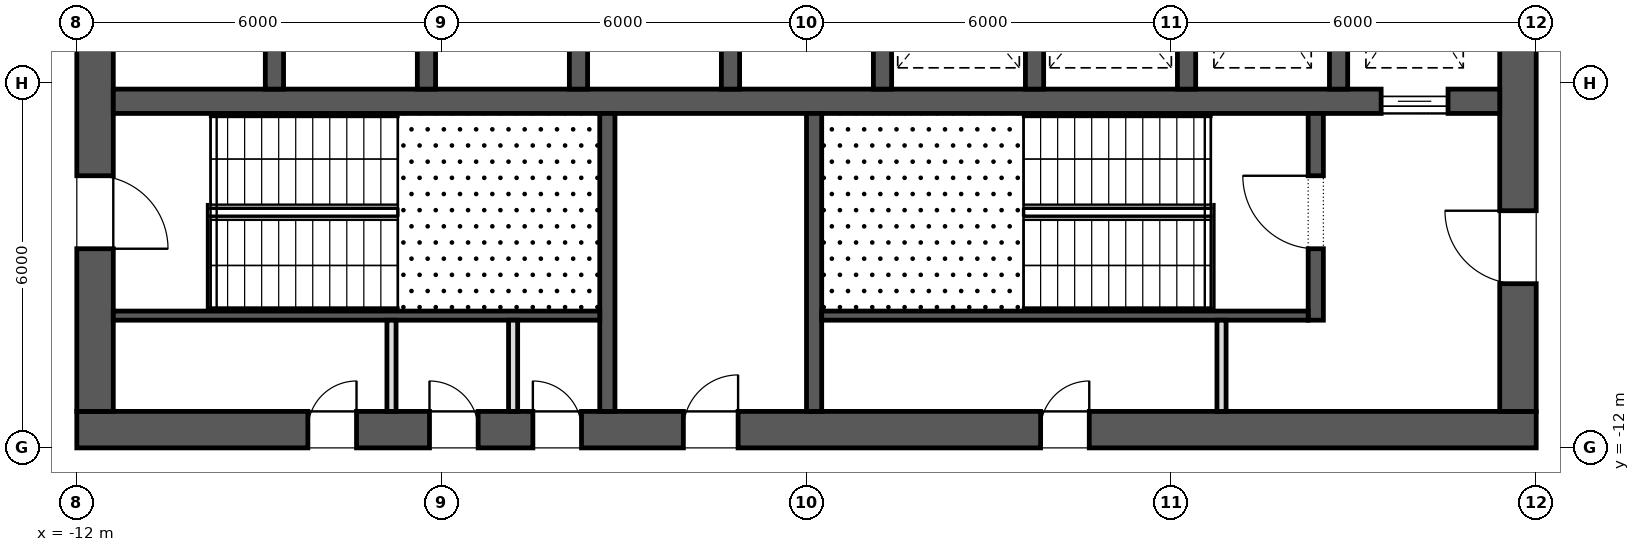
"""IFC4 building model, lengths in metres.
Left out: names, types, materials, properties, quantities, classifications, styles, units other than length and angle.
Written with IfcOpenShell. Run it as: python <this file> out.ifc"""

import sys

from ifc_helpers import new_model, si_unit, direction, frame, frame_2d, origin, place, context, subcontext, project, spatial, rectangle, extrude, element, fill, save


model = new_model("IFC4")
c1 = context("Model", 3, precision=1e-05, world=origin(), true_north=direction((0.0, 1.0)))
c2 = subcontext(c1, "Body", "Model", "MODEL_VIEW")
j1 = project(units=[si_unit("LENGTHUNIT", "METRE"), si_unit("PLANEANGLEUNIT", "RADIAN")], contexts=[c1])
p1 = place(None, origin())
s1 = spatial("IfcSite", under=j1, at=p1, CompositionType="ELEMENT")
p2 = place(p1, origin())
s2 = spatial("IfcBuilding", under=s1, at=p2, CompositionType="ELEMENT")
p3 = place(p2, frame((0.0, 0.0, 86.5)))
s3 = spatial("IfcBuildingStorey", under=s2, at=p3, CompositionType="ELEMENT", Elevation=86.5)
p4 = place(p3, frame((-12.0, -11.7, 0.0), z_axis=(0.0, 0.0, 1.0), x_axis=(1.0, 0.0, 0.0)))
e1 = element("IfcWall", 1, at=p4, inside=s3, PredefinedType="SHEAR", context=c2, shape_type="SweptSolid", body=[
    extrude(rectangle(XDim=24.0, YDim=0.6, at=frame_2d((12.0, 0.0))), origin(), (0.0, 0.0, 1.0), 4.2),
])
p5 = place(p4, frame((9.975, 0.0, 0.0)))
e2 = element("IfcOpeningElement", 2, at=p5, cuts=e1, PredefinedType="OPENING", context=c2, shape_type="SweptSolid", body=[
    extrude(rectangle(XDim=0.9, YDim=2.1, at=frame_2d((0.45, 1.05))), frame((0.0, 0.312, 0.0), z_axis=(0.0, -1.0, 0.0), x_axis=(1.0, 0.0, 0.0)), (0.0, 0.0, 1.0), 0.624),
])
p6 = place(p4, frame((3.8, 0.0, 0.0)))
e3 = element("IfcOpeningElement", 3, at=p6, cuts=e1, PredefinedType="OPENING", context=c2, shape_type="SweptSolid", body=[
    extrude(rectangle(XDim=0.8, YDim=2.1, at=frame_2d((0.4, 1.05))), frame((0.0, 0.312, 0.0), z_axis=(0.0, -1.0, 0.0), x_axis=(1.0, 0.0, 0.0)), (0.0, 0.0, 1.0), 0.624),
])
p7 = place(p4, frame((5.8, 0.0, 0.0)))
e4 = element("IfcOpeningElement", 4, at=p7, cuts=e1, PredefinedType="OPENING", context=c2, shape_type="SweptSolid", body=[
    extrude(rectangle(XDim=0.8, YDim=2.1, at=frame_2d((0.4, 1.05))), frame((0.0, 0.312, 0.0), z_axis=(0.0, -1.0, 0.0), x_axis=(1.0, 0.0, 0.0)), (0.0, 0.0, 1.0), 0.624),
])
p8 = place(p4, frame((7.5, 0.0, 0.0)))
e5 = element("IfcOpeningElement", 5, at=p8, cuts=e1, PredefinedType="OPENING", context=c2, shape_type="SweptSolid", body=[
    extrude(rectangle(XDim=0.8, YDim=2.1, at=frame_2d((0.4, 1.05))), frame((0.0, 0.312, 0.0), z_axis=(0.0, -1.0, 0.0), x_axis=(1.0, 0.0, 0.0)), (0.0, 0.0, 1.0), 0.624),
])
p9 = place(p4, frame((15.85, 0.0, 0.0)))
e6 = element("IfcOpeningElement", 6, at=p9, cuts=e1, PredefinedType="OPENING", context=c2, shape_type="SweptSolid", body=[
    extrude(rectangle(XDim=0.8, YDim=2.1, at=frame_2d((0.4, 1.05))), frame((0.0, 0.312, 0.0), z_axis=(0.0, -1.0, 0.0), x_axis=(1.0, 0.0, 0.0)), (0.0, 0.0, 1.0), 0.624),
])
p10 = place(p3, frame((11.7, -11.4, 0.0), z_axis=(0.0, 0.0, 1.0), x_axis=(0.0, 1.0, 0.0)))
e7 = element("IfcWall", 7, at=p10, inside=s3, PredefinedType="SHEAR", context=c2, shape_type="SweptSolid", body=[
    extrude(rectangle(XDim=22.8, YDim=0.6, at=frame_2d((11.4, 0.0))), origin(), (0.0, 0.0, 1.0), 4.2),
])
p11 = place(p10, frame((10.2, 0.0, 0.0)))
e8 = element("IfcOpeningElement", 8, at=p11, cuts=e7, PredefinedType="OPENING", context=c2, shape_type="SweptSolid", body=[
    extrude(rectangle(XDim=2.4, YDim=2.1, at=frame_2d((1.2, 1.05))), frame((0.0, 0.312, 0.0), z_axis=(0.0, -1.0, 0.0), x_axis=(1.0, 0.0, 0.0)), (0.0, 0.0, 1.0), 0.624),
])
p12 = place(p10, frame((19.5, 0.0, 0.0)))
e9 = element("IfcOpeningElement", 9, at=p12, cuts=e7, PredefinedType="OPENING", context=c2, shape_type="SweptSolid", body=[
    extrude(rectangle(XDim=1.2, YDim=2.1, at=frame_2d((0.6, 1.05))), frame((0.0, 0.312, 0.0), z_axis=(0.0, -1.0, 0.0), x_axis=(1.0, 0.0, 0.0)), (0.0, 0.0, 1.0), 0.624),
])
p13 = place(p10, frame((2.1, 0.0, 0.0)))
e10 = element("IfcOpeningElement", 10, at=p13, cuts=e7, PredefinedType="OPENING", context=c2, shape_type="SweptSolid", body=[
    extrude(rectangle(XDim=1.2, YDim=2.1, at=frame_2d((0.6, 1.05))), frame((0.0, 0.312, 0.0), z_axis=(0.0, -1.0, 0.0), x_axis=(1.0, 0.0, 0.0)), (0.0, 0.0, 1.0), 0.624),
])
p14 = place(p3, frame((-11.7, -11.4, 0.0), z_axis=(0.0, 0.0, 1.0), x_axis=(0.0, 1.0, 0.0)))
e11 = element("IfcWall", 11, at=p14, inside=s3, PredefinedType="SHEAR", context=c2, shape_type="SweptSolid", body=[
    extrude(rectangle(XDim=22.8, YDim=0.6, at=frame_2d((11.4, 0.0))), origin(), (0.0, 0.0, 1.0), 4.2),
])
p15 = place(p14, frame((10.2, 0.0, 0.0)))
e12 = element("IfcOpeningElement", 12, at=p15, cuts=e11, PredefinedType="OPENING", context=c2, shape_type="SweptSolid", body=[
    extrude(rectangle(XDim=2.4, YDim=2.1, at=frame_2d((1.2, 1.05))), frame((0.0, 0.312, 0.0), z_axis=(0.0, -1.0, 0.0), x_axis=(1.0, 0.0, 0.0)), (0.0, 0.0, 1.0), 0.624),
])
p16 = place(p14, frame((18.925, 0.0, 0.0)))
e13 = element("IfcOpeningElement", 13, at=p16, cuts=e11, PredefinedType="OPENING", context=c2, shape_type="SweptSolid", body=[
    extrude(rectangle(XDim=1.2, YDim=2.1, at=frame_2d((0.6, 1.05))), frame((0.0, 0.312, 0.0), z_axis=(0.0, -1.0, 0.0), x_axis=(1.0, 0.0, 0.0)), (0.0, 0.0, 1.0), 0.624),
])
p17 = place(p14, frame((2.675, 0.0, 0.0)))
e14 = element("IfcOpeningElement", 14, at=p17, cuts=e11, PredefinedType="OPENING", context=c2, shape_type="SweptSolid", body=[
    extrude(rectangle(XDim=1.2, YDim=2.1, at=frame_2d((0.6, 1.05))), frame((0.0, 0.312, 0.0), z_axis=(0.0, -1.0, 0.0), x_axis=(1.0, 0.0, 0.0)), (0.0, 0.0, 1.0), 0.624),
])
p18 = place(p3, frame((-11.4, -6.3, 0.0), z_axis=(0.0, 0.0, 1.0), x_axis=(1.0, 0.0, 0.0)))
e15 = element("IfcWall", 15, at=p18, inside=s3, PredefinedType="SHEAR", context=c2, shape_type="SweptSolid", body=[
    extrude(rectangle(XDim=22.8, YDim=0.4, at=frame_2d((11.4, 0.0))), origin(), (0.0, 0.0, 1.0), 4.2),
])
p19 = place(p18, frame((20.85, 0.0, 0.0)))
e16 = element("IfcOpeningElement", 16, at=p19, cuts=e15, PredefinedType="OPENING", context=c2, shape_type="SweptSolid", body=[
    extrude(rectangle(XDim=1.1, YDim=2.1, at=frame_2d((0.55, 1.05))), frame((0.0, 0.212, 0.0), z_axis=(0.0, -1.0, 0.0), x_axis=(1.0, 0.0, 0.0)), (0.0, 0.0, 1.0), 0.424),
])
for number, where, z_axis, x_axis in (
    (17, (-8.75, -6.1, 0.0), (0.0, 0.0, 1.0), (0.0, 1.0, 0.0)),
    (18, (-6.25, -6.1, 0.0), (0.0, 0.0, 1.0), (0.0, 1.0, 0.0)),
    (19, (-3.75, -6.1, 0.0), (0.0, 0.0, 1.0), (0.0, 1.0, 0.0)),
    (20, (-1.25, -6.1, 0.0), (0.0, 0.0, 1.0), (0.0, 1.0, 0.0)),
    (21, (1.25, -6.1, 0.0), (0.0, 0.0, 1.0), (0.0, 1.0, 0.0)),
    (22, (3.75, -6.1, 0.0), (0.0, 0.0, 1.0), (0.0, 1.0, 0.0)),
    (23, (6.25, -6.1, 0.0), (0.0, 0.0, 1.0), (0.0, 1.0, 0.0)),
    (24, (8.75, -6.1, 0.0), (0.0, 0.0, 1.0), (0.0, 1.0, 0.0)),
):
    element("IfcWall", number, at=place(p3, frame(where, z_axis=z_axis, x_axis=x_axis)), inside=s3, PredefinedType="SHEAR", context=c2, shape_type="SweptSolid", body=[
        extrude(rectangle(XDim=2.9, YDim=0.3, at=frame_2d((1.45, 0.0))), origin(), (0.0, 0.0, 1.0), 4.2),
    ])
for number, where, z_axis, x_axis in (
    (25, (-3.275, -11.4, 0.0), (0.0, 0.0, 1.0), (0.0, 1.0, 0.0)),
    (26, (0.125, -11.4, 0.0), (0.0, 0.0, 1.0), (0.0, 1.0, 0.0)),
):
    element("IfcWall", number, at=place(p3, frame(where, z_axis=z_axis, x_axis=x_axis)), inside=s3, PredefinedType="SHEAR", context=c2, shape_type="SweptSolid", body=[
        extrude(rectangle(XDim=4.9, YDim=0.25, at=frame_2d((2.45, 0.0))), origin(), (0.0, 0.0, 1.0), 3.9),
    ])
p20 = place(p3, frame((8.375, -9.9, 0.0), z_axis=(0.0, 0.0, 1.0), x_axis=(0.0, 1.0, 0.0)))
e27 = element("IfcWall", 27, at=p20, inside=s3, PredefinedType="SHEAR", context=c2, shape_type="SweptSolid", body=[
    extrude(rectangle(XDim=3.4, YDim=0.25, at=frame_2d((1.7, 0.0))), origin(), (0.0, 0.0, 1.0), 3.9),
])
p21 = place(p20, frame((1.175, 0.0, 0.0)))
e28 = element("IfcOpeningElement", 28, at=p21, cuts=e27, PredefinedType="OPENING", context=c2, shape_type="SweptSolid", body=[
    extrude(rectangle(XDim=1.2, YDim=2.1, at=frame_2d((0.6, 1.05))), frame((0.0, 0.137, 0.0), z_axis=(0.0, -1.0, 0.0), x_axis=(1.0, 0.0, 0.0)), (0.0, 0.0, 1.0), 0.274),
])
for number, where, z_axis, x_axis in (
    (29, (-11.4, -9.825, 0.0), (0.0, 0.0, 1.0), (1.0, 0.0, 0.0)),
    (30, (0.25, -9.825, 0.0), (0.0, 0.0, 1.0), (1.0, 0.0, 0.0)),
):
    element("IfcWall", number, at=place(p3, frame(where, z_axis=z_axis, x_axis=x_axis)), inside=s3, PredefinedType="SHEAR", context=c2, shape_type="SweptSolid", body=[
        extrude(rectangle(XDim=8.0, YDim=0.15, at=frame_2d((4.0, 0.0))), origin(), (0.0, 0.0, 1.0), 3.9),
    ])
for number, where, z_axis, x_axis in (
    (31, (-6.825, -11.4, 0.0), (0.0, 0.0, 1.0), (0.0, 1.0, 0.0)),
    (32, (-4.825, -11.4, 0.0), (0.0, 0.0, 1.0), (0.0, 1.0, 0.0)),
    (33, (6.825, -11.4, 0.0), (0.0, 0.0, 1.0), (0.0, 1.0, 0.0)),
):
    element("IfcWall", number, at=place(p3, frame(where, z_axis=z_axis, x_axis=x_axis)), inside=s3, PredefinedType="PARTITIONING", context=c2, shape_type="SweptSolid", body=[
        extrude(rectangle(XDim=1.5, YDim=0.15, at=frame_2d((0.75, 0.0))), origin(), (0.0, 0.0, 1.0), 3.9),
    ])
p22 = place(p19, origin())
e34 = element("IfcDoor", 34, at=p22, inside=s3, OperationType="SLIDING_TO_LEFT", PredefinedType="DOOR", context=c2, shape_type="SweptSolid", body=[
    extrude(rectangle(XDim=1.1, YDim=2.1, at=frame_2d((0.55, 1.05))), frame((0.0, 0.025, 0.0), z_axis=(0.0, -1.0, 0.0), x_axis=(1.0, 0.0, 0.0)), (0.0, 0.0, 1.0), 0.05),
])
fill(e16, e34)
p23 = place(p17, frame((1.2, 0.0, 0.0), z_axis=(0.0, 0.0, 1.0), x_axis=(-1.0, 0.0, 0.0)))
e35 = element("IfcDoor", 35, at=p23, inside=s3, OperationType="SINGLE_SWING_LEFT", PredefinedType="DOOR", context=c2, shape_type="SweptSolid", body=[
    extrude(rectangle(XDim=1.2, YDim=2.1, at=frame_2d((0.6, 1.05))), frame((0.0, 0.025, 0.0), z_axis=(0.0, -1.0, 0.0), x_axis=(1.0, 0.0, 0.0)), (0.0, 0.0, 1.0), 0.05),
])
fill(e14, e35)
p24 = place(p21, origin())
e36 = element("IfcDoor", 36, at=p24, inside=s3, OperationType="SINGLE_SWING_LEFT", PredefinedType="DOOR", context=c2, shape_type="SweptSolid", body=[
    extrude(rectangle(XDim=1.2, YDim=2.1, at=frame_2d((0.6, 1.05))), frame((0.0, 0.025, 0.0), z_axis=(0.0, -1.0, 0.0), x_axis=(1.0, 0.0, 0.0)), (0.0, 0.0, 1.0), 0.05),
])
fill(e28, e36)
p25 = place(p13, origin())
e37 = element("IfcDoor", 37, at=p25, inside=s3, OperationType="SINGLE_SWING_LEFT", PredefinedType="DOOR", context=c2, shape_type="SweptSolid", body=[
    extrude(rectangle(XDim=1.2, YDim=2.1, at=frame_2d((0.6, 1.05))), frame((0.0, 0.025, 0.0), z_axis=(0.0, -1.0, 0.0), x_axis=(1.0, 0.0, 0.0)), (0.0, 0.0, 1.0), 0.05),
])
fill(e10, e37)
p26 = place(p5, origin())
e38 = element("IfcDoor", 38, at=p26, inside=s3, OperationType="SINGLE_SWING_LEFT", PredefinedType="DOOR", context=c2, shape_type="SweptSolid", body=[
    extrude(rectangle(XDim=0.9, YDim=2.1, at=frame_2d((0.45, 1.05))), frame((0.0, 0.025, 0.0), z_axis=(0.0, -1.0, 0.0), x_axis=(1.0, 0.0, 0.0)), (0.0, 0.0, 1.0), 0.05),
])
fill(e2, e38)
p27 = place(p6, origin())
e39 = element("IfcDoor", 39, at=p27, inside=s3, OperationType="SINGLE_SWING_LEFT", PredefinedType="DOOR", context=c2, shape_type="SweptSolid", body=[
    extrude(rectangle(XDim=0.8, YDim=2.1, at=frame_2d((0.4, 1.05))), frame((0.0, 0.025, 0.0), z_axis=(0.0, -1.0, 0.0), x_axis=(1.0, 0.0, 0.0)), (0.0, 0.0, 1.0), 0.05),
])
fill(e3, e39)
p28 = place(p7, origin())
e40 = element("IfcDoor", 40, at=p28, inside=s3, OperationType="SINGLE_SWING_RIGHT", PredefinedType="DOOR", context=c2, shape_type="SweptSolid", body=[
    extrude(rectangle(XDim=0.8, YDim=2.1, at=frame_2d((0.4, 1.05))), frame((0.0, 0.025, 0.0), z_axis=(0.0, -1.0, 0.0), x_axis=(1.0, 0.0, 0.0)), (0.0, 0.0, 1.0), 0.05),
])
fill(e4, e40)
p29 = place(p8, origin())
e41 = element("IfcDoor", 41, at=p29, inside=s3, OperationType="SINGLE_SWING_RIGHT", PredefinedType="DOOR", context=c2, shape_type="SweptSolid", body=[
    extrude(rectangle(XDim=0.8, YDim=2.1, at=frame_2d((0.4, 1.05))), frame((0.0, 0.025, 0.0), z_axis=(0.0, -1.0, 0.0), x_axis=(1.0, 0.0, 0.0)), (0.0, 0.0, 1.0), 0.05),
])
fill(e5, e41)
p30 = place(p9, origin())
e42 = element("IfcDoor", 42, at=p30, inside=s3, OperationType="SINGLE_SWING_LEFT", PredefinedType="DOOR", context=c2, shape_type="SweptSolid", body=[
    extrude(rectangle(XDim=0.8, YDim=2.1, at=frame_2d((0.4, 1.05))), frame((0.0, 0.025, 0.0), z_axis=(0.0, -1.0, 0.0), x_axis=(1.0, 0.0, 0.0)), (0.0, 0.0, 1.0), 0.05),
])
fill(e6, e42)
save(model, sys.argv[1])
